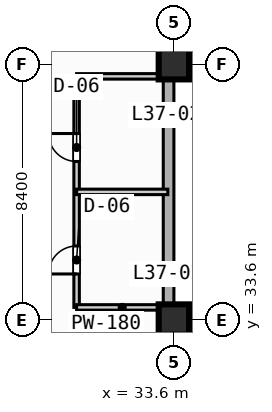
"""IFC4 building model, lengths in metres.
Left out: names, types, materials, properties, quantities, classifications, styles, units other than length and angle.
Written with IfcOpenShell. Run it as: python <this file> out.ifc"""

import sys

from ifc_helpers import new_model, si_unit, direction, frame, frame_2d, origin, origin_2d, place, context, subcontext, project, spatial, rectangle, extrude, element, fill, save


model = new_model("IFC4")
c1 = context("Model", 3, precision=1e-05, world=origin(), true_north=direction((0.0, 1.0)))
c2 = subcontext(c1, "Body", "Model", "MODEL_VIEW")
j1 = project(units=[si_unit("LENGTHUNIT", "METRE"), si_unit("PLANEANGLEUNIT", "RADIAN")], contexts=[c1])
p1 = place(None, origin())
s1 = spatial("IfcSite", under=j1, at=p1, CompositionType="ELEMENT")
p2 = place(p1, origin())
s2 = spatial("IfcBuilding", under=s1, at=p2, CompositionType="ELEMENT")
p3 = place(p2, frame((0.0, 0.0, 153.2)))
s3 = spatial("IfcBuildingStorey", under=s2, at=p3, CompositionType="ELEMENT", Elevation=153.2)
for number, where, z_axis, x_axis in (
    (1, (33.6, 33.6, 0.0), (0.0, 0.0, 1.0), (1.0, 0.0, 0.0)),
    (2, (33.6, 42.0, 0.0), (0.0, 0.0, 1.0), (1.0, 0.0, 0.0)),
):
    element("IfcColumn", number, at=place(p3, frame(where, z_axis=z_axis, x_axis=x_axis)), inside=s3, PredefinedType="COLUMN", context=c2, shape_type="SweptSolid", body=[
        extrude(rectangle(XDim=1.0, YDim=1.0, at=origin_2d()), origin(), (0.0, 0.0, 1.0), 4.4),
    ])
p4 = place(p3, frame((33.425, 72.425, 0.0), z_axis=(0.0, 0.0, 1.0), x_axis=(0.0, -1.0, 0.0)))
e3 = element("IfcWall", 3, at=p4, inside=s3, PredefinedType="STANDARD", context=c2, shape_type="SweptSolid", body=[
    extrude(rectangle(XDim=39.0, YDim=0.35, at=frame_2d((19.5, 0.0))), origin(), (0.0, 0.0, 1.0), 4.15),
])
p5 = place(p3, frame((33.425, 33.425, 0.0), z_axis=(0.0, 0.0, 1.0), x_axis=(1.0, 0.0, 0.0)))
e4 = element("IfcWall", 4, at=p5, inside=s3, PredefinedType="STANDARD", context=c2, shape_type="SweptSolid", body=[
    extrude(rectangle(XDim=39.0, YDim=0.35, at=frame_2d((19.5, 0.0))), origin(), (0.0, 0.0, 1.0), 4.15),
])
p6 = place(p5, frame((12.075, 0.0, 0.0)))
e5 = element("IfcOpeningElement", 5, at=p6, cuts=e4, PredefinedType="OPENING", context=c2, shape_type="SweptSolid", body=[
    extrude(rectangle(XDim=1.4, YDim=2.2, at=frame_2d((0.7, 1.1))), frame((0.0, 0.185, 0.0), z_axis=(0.0, -1.0, 0.0), x_axis=(1.0, 0.0, 0.0)), (0.0, 0.0, 1.0), 0.37),
])
p7 = place(p3, frame((30.4, 34.0, 0.0), z_axis=(0.0, 0.0, 1.0), x_axis=(0.0, 1.0, 0.0)))
e6 = element("IfcWall", 6, at=p7, inside=s3, PredefinedType="PLUMBINGWALL", context=c2, shape_type="SweptSolid", body=[
    extrude(rectangle(XDim=7.6, YDim=0.18, at=frame_2d((3.8, 0.0))), origin(), (0.0, 0.0, 1.0), 4.15),
])
p8 = place(p7, frame((1.1, 0.0, 0.0)))
e7 = element("IfcOpeningElement", 7, at=p8, cuts=e6, PredefinedType="OPENING", context=c2, shape_type="SweptSolid", body=[
    extrude(rectangle(XDim=0.92, YDim=2.1, at=frame_2d((0.46, 1.05))), frame((0.0, 0.1, 0.0), z_axis=(0.0, -1.0, 0.0), x_axis=(1.0, 0.0, 0.0)), (0.0, 0.0, 1.0), 0.2),
])
p9 = place(p7, frame((4.8, 0.0, 0.0)))
e8 = element("IfcOpeningElement", 8, at=p9, cuts=e6, PredefinedType="OPENING", context=c2, shape_type="SweptSolid", body=[
    extrude(rectangle(XDim=0.92, YDim=2.1, at=frame_2d((0.46, 1.05))), frame((0.0, 0.1, 0.0), z_axis=(0.0, -1.0, 0.0), x_axis=(1.0, 0.0, 0.0)), (0.0, 0.0, 1.0), 0.2),
])
for number, where, z_axis, x_axis in (
    (9, (30.4, 34.0, 0.0), (0.0, 0.0, 1.0), (1.0, 0.0, 0.0)),
    (10, (30.4, 37.8, 0.0), (0.0, 0.0, 1.0), (1.0, 0.0, 0.0)),
    (11, (30.4, 41.6, 0.0), (0.0, 0.0, 1.0), (1.0, 0.0, 0.0)),
):
    element("IfcWall", number, at=place(p3, frame(where, z_axis=z_axis, x_axis=x_axis)), inside=s3, PredefinedType="PLUMBINGWALL", context=c2, shape_type="SweptSolid", body=[
        extrude(rectangle(XDim=3.0, YDim=0.18, at=frame_2d((1.5, 0.0))), origin(), (0.0, 0.0, 1.0), 4.15),
    ])
p10 = place(p8, origin())
e12 = element("IfcDoor", 12, at=p10, inside=s3, OperationType="SINGLE_SWING_LEFT", PredefinedType="DOOR", context=c2, shape_type="SweptSolid", body=[
    extrude(rectangle(XDim=0.92, YDim=2.1, at=frame_2d((0.46, 1.05))), frame((0.0, 0.025, 0.0), z_axis=(0.0, -1.0, 0.0), x_axis=(1.0, 0.0, 0.0)), (0.0, 0.0, 1.0), 0.05),
])
fill(e7, e12)
p11 = place(p9, origin())
e13 = element("IfcDoor", 13, at=p11, inside=s3, OperationType="SINGLE_SWING_RIGHT", PredefinedType="DOOR", context=c2, shape_type="SweptSolid", body=[
    extrude(rectangle(XDim=0.92, YDim=2.1, at=frame_2d((0.46, 1.05))), frame((0.0, 0.025, 0.0), z_axis=(0.0, -1.0, 0.0), x_axis=(1.0, 0.0, 0.0)), (0.0, 0.0, 1.0), 0.05),
])
fill(e8, e13)
save(model, sys.argv[1])
